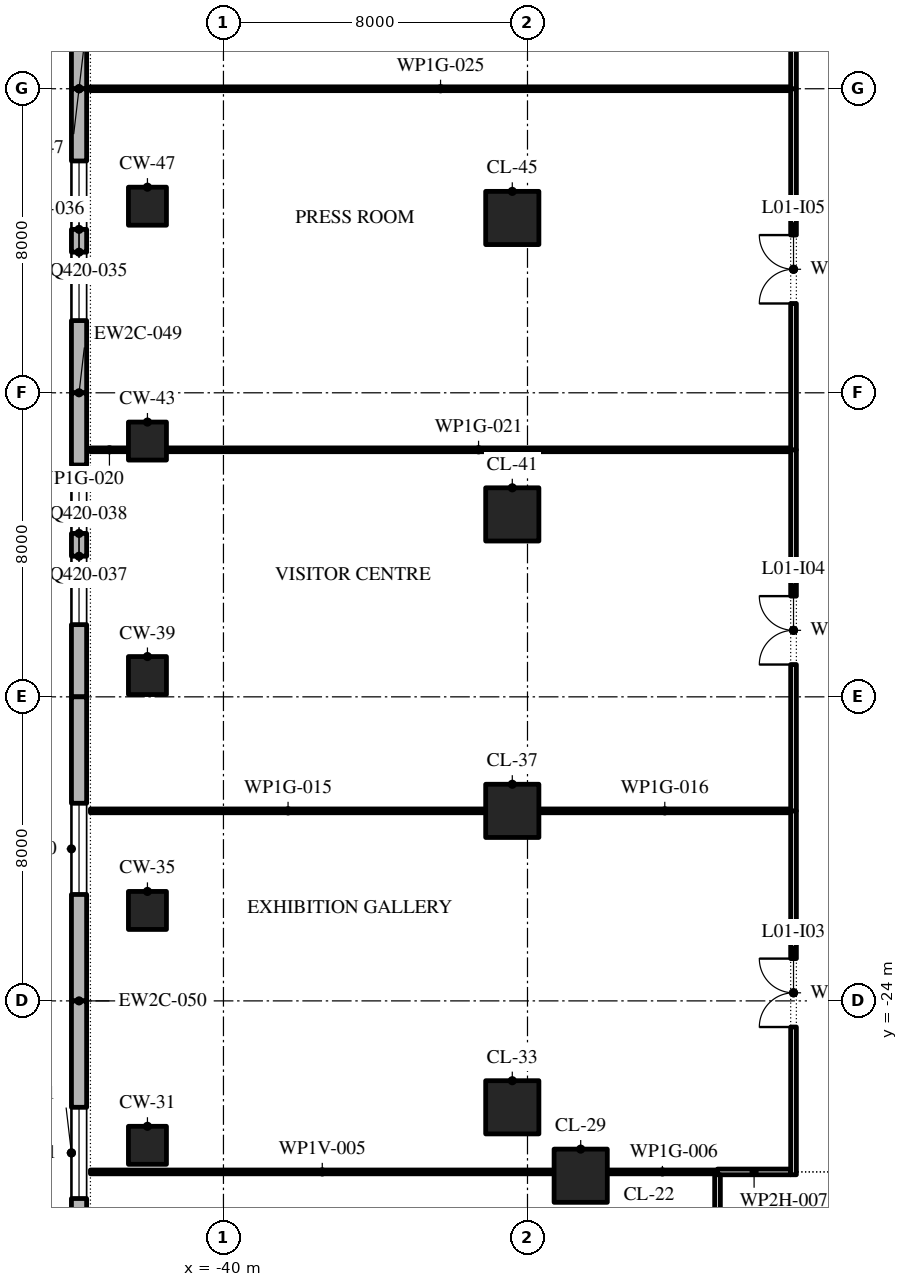
"""IFC4 building model, lengths in metres.
Left out: names, types, materials, properties, quantities, classifications, styles, units other than length and angle.
Written with IfcOpenShell. Run it as: python <this file> out.ifc"""

import sys

from ifc_helpers import new_model, si_unit, direction, frame, frame_2d, origin, origin_2d, place, context, subcontext, project, spatial, polyline, rectangle, outline, extrude, element, fill, save


model = new_model("IFC4")
c1 = context("Model", 3, precision=1e-05, world=origin(), true_north=direction((0.0, 1.0)))
c2 = subcontext(c1, "Body", "Model", "MODEL_VIEW")
j1 = project(units=[si_unit("LENGTHUNIT", "METRE"), si_unit("PLANEANGLEUNIT", "RADIAN")], contexts=[c1])
p1 = place(None, origin())
s1 = spatial("IfcSite", under=j1, at=p1, CompositionType="ELEMENT")
p2 = place(p1, origin())
s2 = spatial("IfcBuilding", under=s1, at=p2, CompositionType="ELEMENT")
p3 = place(p2, frame((0.0, 0.0, 8.0)))
s3 = spatial("IfcBuildingStorey", under=s2, at=p3, CompositionType="ELEMENT", Elevation=8.0)
p4 = place(p3, frame((-30.6, -28.6, 0.0), z_axis=(0.0, 0.0, 1.0), x_axis=(1.0, 0.0, 0.0)))
e1 = element("IfcColumn", 1, at=p4, inside=s3, PredefinedType="COLUMN", context=c2, shape_type="SweptSolid", body=[
    extrude(rectangle(XDim=1.4, YDim=1.4, at=origin_2d()), origin(), (0.0, 0.0, 1.0), 6.0),
])
p5 = place(p3, frame((-42.0, -27.8, 0.0), z_axis=(0.0, 0.0, 1.0), x_axis=(1.0, 0.0, 0.0)))
e2 = element("IfcColumn", 2, at=p5, inside=s3, PredefinedType="COLUMN", context=c2, shape_type="SweptSolid", body=[
    extrude(rectangle(XDim=1.0, YDim=1.0, at=origin_2d()), origin(), (0.0, 0.0, 1.0), 6.0),
])
p6 = place(p3, frame((-32.4, -26.8, 0.0), z_axis=(0.0, 0.0, 1.0), x_axis=(1.0, 0.0, 0.0)))
e3 = element("IfcColumn", 3, at=p6, inside=s3, PredefinedType="COLUMN", context=c2, shape_type="SweptSolid", body=[
    extrude(rectangle(XDim=1.4, YDim=1.4, at=origin_2d()), origin(), (0.0, 0.0, 1.0), 6.0),
])
p7 = place(p3, frame((-42.0, -21.62, 0.0), z_axis=(0.0, 0.0, 1.0), x_axis=(1.0, 0.0, 0.0)))
e4 = element("IfcColumn", 4, at=p7, inside=s3, PredefinedType="COLUMN", context=c2, shape_type="SweptSolid", body=[
    extrude(rectangle(XDim=1.0, YDim=1.0, at=origin_2d()), origin(), (0.0, 0.0, 1.0), 6.0),
])
p8 = place(p3, frame((-32.4, -19.0, 0.0), z_axis=(0.0, 0.0, 1.0), x_axis=(1.0, 0.0, 0.0)))
e5 = element("IfcColumn", 5, at=p8, inside=s3, PredefinedType="COLUMN", context=c2, shape_type="SweptSolid", body=[
    extrude(rectangle(XDim=1.4, YDim=1.4, at=origin_2d()), origin(), (0.0, 0.0, 1.0), 6.0),
])
p9 = place(p3, frame((-42.0, -15.44, 0.0), z_axis=(0.0, 0.0, 1.0), x_axis=(1.0, 0.0, 0.0)))
e6 = element("IfcColumn", 6, at=p9, inside=s3, PredefinedType="COLUMN", context=c2, shape_type="SweptSolid", body=[
    extrude(rectangle(XDim=1.0, YDim=1.0, at=origin_2d()), origin(), (0.0, 0.0, 1.0), 6.0),
])
p10 = place(p3, frame((-32.4, -11.2, 0.0), z_axis=(0.0, 0.0, 1.0), x_axis=(1.0, 0.0, 0.0)))
e7 = element("IfcColumn", 7, at=p10, inside=s3, PredefinedType="COLUMN", context=c2, shape_type="SweptSolid", body=[
    extrude(rectangle(XDim=1.4, YDim=1.4, at=origin_2d()), origin(), (0.0, 0.0, 1.0), 6.0),
])
p11 = place(p3, frame((-42.0, -9.27, 0.0), z_axis=(0.0, 0.0, 1.0), x_axis=(1.0, 0.0, 0.0)))
e8 = element("IfcColumn", 8, at=p11, inside=s3, PredefinedType="COLUMN", context=c2, shape_type="SweptSolid", body=[
    extrude(rectangle(XDim=1.0, YDim=1.0, at=origin_2d()), origin(), (0.0, 0.0, 1.0), 6.0),
])
p12 = place(p3, frame((-32.4, -3.4, 0.0), z_axis=(0.0, 0.0, 1.0), x_axis=(1.0, 0.0, 0.0)))
e9 = element("IfcColumn", 9, at=p12, inside=s3, PredefinedType="COLUMN", context=c2, shape_type="SweptSolid", body=[
    extrude(rectangle(XDim=1.4, YDim=1.4, at=origin_2d()), origin(), (0.0, 0.0, 1.0), 6.0),
])
p13 = place(p3, frame((-42.0, -3.09, 0.0), z_axis=(0.0, 0.0, 1.0), x_axis=(1.0, 0.0, 0.0)))
e10 = element("IfcColumn", 10, at=p13, inside=s3, PredefinedType="COLUMN", context=c2, shape_type="SweptSolid", body=[
    extrude(rectangle(XDim=1.0, YDim=1.0, at=origin_2d()), origin(), (0.0, 0.0, 1.0), 6.0),
])
p14 = place(p3, frame((-43.8, 8.0, 0.0), z_axis=(0.0, 0.0, 1.0), x_axis=(0.0, -1.0, 0.0)))
e11 = element("IfcWall", 11, at=p14, inside=s3, PredefinedType="STANDARD", context=c2, shape_type="SweptSolid", body=[
    extrude(rectangle(XDim=8.0, YDim=0.4, at=frame_2d((4.0, 0.0))), origin(), (0.0, 0.0, 1.0), 5.7),
])
p15 = place(p14, frame((1.9, 0.0, 0.9)))
e12 = element("IfcOpeningElement", 12, at=p15, cuts=e11, PredefinedType="OPENING", context=c2, shape_type="SweptSolid", body=[
    extrude(outline(polyline([(0.0, 0.0), (1.8, 0.0), (1.8, 2.641), (1.785, 2.876), (1.739, 3.107), (1.663, 3.33), (1.559, 3.541), (1.428, 3.737), (1.273, 3.914), (1.096, 4.069), (0.9, 4.2), (0.704, 4.069), (0.527, 3.914), (0.372, 3.737), (0.241, 3.541), (0.137, 3.33), (0.061, 3.107), (0.015, 2.876), (0.0, 2.641), (0.0, 0.0)])), frame((0.0, 0.21, 0.0), z_axis=(0.0, -1.0, 0.0), x_axis=(1.0, 0.0, 0.0)), (0.0, 0.0, 1.0), 0.42),
])
p16 = place(p14, frame((4.3, 0.0, 0.9)))
e13 = element("IfcOpeningElement", 13, at=p16, cuts=e11, PredefinedType="OPENING", context=c2, shape_type="SweptSolid", body=[
    extrude(outline(polyline([(0.0, 0.0), (1.8, 0.0), (1.8, 2.641), (1.785, 2.876), (1.739, 3.107), (1.663, 3.33), (1.559, 3.541), (1.428, 3.737), (1.273, 3.914), (1.096, 4.069), (0.9, 4.2), (0.704, 4.069), (0.527, 3.914), (0.372, 3.737), (0.241, 3.541), (0.137, 3.33), (0.061, 3.107), (0.015, 2.876), (0.0, 2.641), (0.0, 0.0)])), frame((0.0, 0.21, 0.0), z_axis=(0.0, -1.0, 0.0), x_axis=(1.0, 0.0, 0.0)), (0.0, 0.0, 1.0), 0.42),
])
p17 = place(p3, frame((-43.8, 0.0, 0.0), z_axis=(0.0, 0.0, 1.0), x_axis=(0.0, -1.0, 0.0)))
e14 = element("IfcWall", 14, at=p17, inside=s3, PredefinedType="STANDARD", context=c2, shape_type="SweptSolid", body=[
    extrude(rectangle(XDim=8.0, YDim=0.4, at=frame_2d((4.0, 0.0))), origin(), (0.0, 0.0, 1.0), 5.7),
])
p18 = place(p17, frame((1.9, 0.0, 0.9)))
e15 = element("IfcOpeningElement", 15, at=p18, cuts=e14, PredefinedType="OPENING", context=c2, shape_type="SweptSolid", body=[
    extrude(outline(polyline([(0.0, 0.0), (1.8, 0.0), (1.8, 2.641), (1.785, 2.876), (1.739, 3.107), (1.663, 3.33), (1.559, 3.541), (1.428, 3.737), (1.273, 3.914), (1.096, 4.069), (0.9, 4.2), (0.704, 4.069), (0.527, 3.914), (0.372, 3.737), (0.241, 3.541), (0.137, 3.33), (0.061, 3.107), (0.015, 2.876), (0.0, 2.641), (0.0, 0.0)])), frame((0.0, 0.21, 0.0), z_axis=(0.0, -1.0, 0.0), x_axis=(1.0, 0.0, 0.0)), (0.0, 0.0, 1.0), 0.42),
])
p19 = place(p17, frame((4.3, 0.0, 0.9)))
e16 = element("IfcOpeningElement", 16, at=p19, cuts=e14, PredefinedType="OPENING", context=c2, shape_type="SweptSolid", body=[
    extrude(outline(polyline([(0.0, 0.0), (1.8, 0.0), (1.8, 2.641), (1.785, 2.876), (1.739, 3.107), (1.663, 3.33), (1.559, 3.541), (1.428, 3.737), (1.273, 3.914), (1.096, 4.069), (0.9, 4.2), (0.704, 4.069), (0.527, 3.914), (0.372, 3.737), (0.241, 3.541), (0.137, 3.33), (0.061, 3.107), (0.015, 2.876), (0.0, 2.641), (0.0, 0.0)])), frame((0.0, 0.21, 0.0), z_axis=(0.0, -1.0, 0.0), x_axis=(1.0, 0.0, 0.0)), (0.0, 0.0, 1.0), 0.42),
])
p20 = place(p3, frame((-43.8, -8.0, 0.0), z_axis=(0.0, 0.0, 1.0), x_axis=(0.0, -1.0, 0.0)))
e17 = element("IfcWall", 17, at=p20, inside=s3, PredefinedType="STANDARD", context=c2, shape_type="SweptSolid", body=[
    extrude(rectangle(XDim=8.0, YDim=0.4, at=frame_2d((4.0, 0.0))), origin(), (0.0, 0.0, 1.0), 5.7),
])
p21 = place(p20, frame((1.9, 0.0, 0.9)))
e18 = element("IfcOpeningElement", 18, at=p21, cuts=e17, PredefinedType="OPENING", context=c2, shape_type="SweptSolid", body=[
    extrude(outline(polyline([(0.0, 0.0), (1.8, 0.0), (1.8, 2.641), (1.785, 2.876), (1.739, 3.107), (1.663, 3.33), (1.559, 3.541), (1.428, 3.737), (1.273, 3.914), (1.096, 4.069), (0.9, 4.2), (0.704, 4.069), (0.527, 3.914), (0.372, 3.737), (0.241, 3.541), (0.137, 3.33), (0.061, 3.107), (0.015, 2.876), (0.0, 2.641), (0.0, 0.0)])), frame((0.0, 0.21, 0.0), z_axis=(0.0, -1.0, 0.0), x_axis=(1.0, 0.0, 0.0)), (0.0, 0.0, 1.0), 0.42),
])
p22 = place(p20, frame((4.3, 0.0, 0.9)))
e19 = element("IfcOpeningElement", 19, at=p22, cuts=e17, PredefinedType="OPENING", context=c2, shape_type="SweptSolid", body=[
    extrude(outline(polyline([(0.0, 0.0), (1.8, 0.0), (1.8, 2.641), (1.785, 2.876), (1.739, 3.107), (1.663, 3.33), (1.559, 3.541), (1.428, 3.737), (1.273, 3.914), (1.096, 4.069), (0.9, 4.2), (0.704, 4.069), (0.527, 3.914), (0.372, 3.737), (0.241, 3.541), (0.137, 3.33), (0.061, 3.107), (0.015, 2.876), (0.0, 2.641), (0.0, 0.0)])), frame((0.0, 0.21, 0.0), z_axis=(0.0, -1.0, 0.0), x_axis=(1.0, 0.0, 0.0)), (0.0, 0.0, 1.0), 0.42),
])
p23 = place(p3, frame((-43.8, -16.0, 0.0), z_axis=(0.0, 0.0, 1.0), x_axis=(0.0, -1.0, 0.0)))
e20 = element("IfcWall", 20, at=p23, inside=s3, PredefinedType="STANDARD", context=c2, shape_type="SweptSolid", body=[
    extrude(rectangle(XDim=8.0, YDim=0.4, at=frame_2d((4.0, 0.0))), origin(), (0.0, 0.0, 1.0), 5.7),
])
p24 = place(p23, frame((2.8, 0.0, 0.9)))
e21 = element("IfcOpeningElement", 21, at=p24, cuts=e20, PredefinedType="OPENING", context=c2, shape_type="SweptSolid", body=[
    extrude(outline(polyline([(0.0, 0.0), (2.4, 0.0), (2.4, 2.122), (2.379, 2.435), (2.318, 2.743), (2.217, 3.04), (2.078, 3.322), (1.904, 3.583), (1.697, 3.819), (1.461, 4.026), (1.2, 4.2), (0.939, 4.026), (0.703, 3.819), (0.496, 3.583), (0.322, 3.322), (0.183, 3.04), (0.082, 2.743), (0.021, 2.435), (0.0, 2.122), (0.0, 0.0)])), frame((0.0, 0.21, 0.0), z_axis=(0.0, -1.0, 0.0), x_axis=(1.0, 0.0, 0.0)), (0.0, 0.0, 1.0), 0.42),
])
p25 = place(p3, frame((-43.8, -24.0, 0.0), z_axis=(0.0, 0.0, 1.0), x_axis=(0.0, -1.0, 0.0)))
e22 = element("IfcWall", 22, at=p25, inside=s3, PredefinedType="STANDARD", context=c2, shape_type="SweptSolid", body=[
    extrude(rectangle(XDim=8.0, YDim=0.4, at=frame_2d((4.0, 0.0))), origin(), (0.0, 0.0, 1.0), 5.7),
])
p26 = place(p25, frame((2.8, 0.0, 0.9)))
e23 = element("IfcOpeningElement", 23, at=p26, cuts=e22, PredefinedType="OPENING", context=c2, shape_type="SweptSolid", body=[
    extrude(outline(polyline([(0.0, 0.0), (2.4, 0.0), (2.4, 2.122), (2.379, 2.435), (2.318, 2.743), (2.217, 3.04), (2.078, 3.322), (1.904, 3.583), (1.697, 3.819), (1.461, 4.026), (1.2, 4.2), (0.939, 4.026), (0.703, 3.819), (0.496, 3.583), (0.322, 3.322), (0.183, 3.04), (0.082, 2.743), (0.021, 2.435), (0.0, 2.122), (0.0, 0.0)])), frame((0.0, 0.21, 0.0), z_axis=(0.0, -1.0, 0.0), x_axis=(1.0, 0.0, 0.0)), (0.0, 0.0, 1.0), 0.42),
])
p27 = place(p3, frame((-43.5, -28.5, 0.0), z_axis=(0.0, 0.0, 1.0), x_axis=(1.0, 0.0, 0.0)))
e24 = element("IfcWall", 24, at=p27, inside=s3, PredefinedType="PARTITIONING", context=c2, shape_type="SweptSolid", body=[
    extrude(rectangle(XDim=12.2, YDim=0.1, at=frame_2d((6.1, 0.0))), origin(), (0.0, 0.0, 1.0), 5.164),
])
p28 = place(p3, frame((-29.9, -28.5, 0.0), z_axis=(0.0, 0.0, 1.0), x_axis=(1.0, 0.0, 0.0)))
e25 = element("IfcWall", 25, at=p28, inside=s3, PredefinedType="PARTITIONING", context=c2, shape_type="SweptSolid", body=[
    extrude(rectangle(XDim=2.9, YDim=0.1, at=frame_2d((1.45, 0.0))), origin(), (0.0, 0.0, 1.0), 5.7),
])
p29 = place(p3, frame((-27.0, -28.5, 0.0), z_axis=(0.0, 0.0, 1.0), x_axis=(1.0, 0.0, 0.0)))
e26 = element("IfcWall", 26, at=p29, inside=s3, PredefinedType="PARTITIONING", context=c2, shape_type="SweptSolid", body=[
    extrude(rectangle(XDim=1.925, YDim=0.15, at=frame_2d((0.962, 0.0))), origin(), (0.0, 0.0, 1.0), 5.7),
])
p30 = place(p3, frame((-43.5, -19.0, 0.0), z_axis=(0.0, 0.0, 1.0), x_axis=(1.0, 0.0, 0.0)))
e27 = element("IfcWall", 27, at=p30, inside=s3, PredefinedType="PARTITIONING", context=c2, shape_type="SweptSolid", body=[
    extrude(rectangle(XDim=10.4, YDim=0.1, at=frame_2d((5.2, 0.0))), origin(), (0.0, 0.0, 1.0), 5.7),
])
p31 = place(p3, frame((-31.7, -19.0, 0.0), z_axis=(0.0, 0.0, 1.0), x_axis=(1.0, 0.0, 0.0)))
e28 = element("IfcWall", 28, at=p31, inside=s3, PredefinedType="PARTITIONING", context=c2, shape_type="SweptSolid", body=[
    extrude(rectangle(XDim=6.625, YDim=0.1, at=frame_2d((3.312, 0.0))), origin(), (0.0, 0.0, 1.0), 5.7),
])
p32 = place(p3, frame((-43.5, -9.5, 0.0), z_axis=(0.0, 0.0, 1.0), x_axis=(1.0, 0.0, 0.0)))
e29 = element("IfcWall", 29, at=p32, inside=s3, PredefinedType="PARTITIONING", context=c2, shape_type="SweptSolid", body=[
    extrude(rectangle(XDim=1.0, YDim=0.1, at=frame_2d((0.5, 0.0))), origin(), (0.0, 0.0, 1.0), 5.7),
])
p33 = place(p3, frame((-41.5, -9.5, 0.0), z_axis=(0.0, 0.0, 1.0), x_axis=(1.0, 0.0, 0.0)))
e30 = element("IfcWall", 30, at=p33, inside=s3, PredefinedType="PARTITIONING", context=c2, shape_type="SweptSolid", body=[
    extrude(rectangle(XDim=16.425, YDim=0.1, at=frame_2d((8.212, 0.0))), origin(), (0.0, 0.0, 1.0), 5.7),
])
p34 = place(p3, frame((-43.5, 0.0, 0.0), z_axis=(0.0, 0.0, 1.0), x_axis=(1.0, 0.0, 0.0)))
e31 = element("IfcWall", 31, at=p34, inside=s3, PredefinedType="PARTITIONING", context=c2, shape_type="SweptSolid", body=[
    extrude(rectangle(XDim=18.425, YDim=0.1, at=frame_2d((9.212, 0.0))), origin(), (0.0, 0.0, 1.0), 5.7),
])
p35 = place(p3, frame((-27.0, -32.0, 0.0), z_axis=(0.0, 0.0, 1.0), x_axis=(0.0, 1.0, 0.0)))
e32 = element("IfcWall", 32, at=p35, inside=s3, PredefinedType="PARTITIONING", context=c2, shape_type="SweptSolid", body=[
    extrude(rectangle(XDim=3.425, YDim=0.15, at=frame_2d((1.712, 0.0))), origin(), (0.0, 0.0, 1.0), 5.7),
])
p36 = place(p3, frame((-25.0, -28.575, 0.0), z_axis=(0.0, 0.0, 1.0), x_axis=(0.0, 1.0, 0.0)))
e33 = element("IfcWall", 33, at=p36, inside=s3, PredefinedType="PARTITIONING", context=c2, shape_type="SweptSolid", body=[
    extrude(rectangle(XDim=9.575, YDim=0.15, at=frame_2d((4.788, 0.0))), origin(), (0.0, 0.0, 1.0), 5.7),
])
p37 = place(p36, frame((3.887, 0.0, 0.0)))
e34 = element("IfcOpeningElement", 34, at=p37, cuts=e33, PredefinedType="OPENING", context=c2, shape_type="SweptSolid", body=[
    extrude(rectangle(XDim=1.8, YDim=2.1, at=frame_2d((0.9, 1.05))), frame((0.0, 0.085, 0.0), z_axis=(0.0, -1.0, 0.0), x_axis=(1.0, 0.0, 0.0)), (0.0, 0.0, 1.0), 0.17),
])
p38 = place(p3, frame((-25.0, -19.0, 0.0), z_axis=(0.0, 0.0, 1.0), x_axis=(0.0, 1.0, 0.0)))
e35 = element("IfcWall", 35, at=p38, inside=s3, PredefinedType="PARTITIONING", context=c2, shape_type="SweptSolid", body=[
    extrude(rectangle(XDim=9.5, YDim=0.15, at=frame_2d((4.75, 0.0))), origin(), (0.0, 0.0, 1.0), 5.7),
])
p39 = place(p38, frame((3.85, 0.0, 0.0)))
e36 = element("IfcOpeningElement", 36, at=p39, cuts=e35, PredefinedType="OPENING", context=c2, shape_type="SweptSolid", body=[
    extrude(rectangle(XDim=1.8, YDim=2.1, at=frame_2d((0.9, 1.05))), frame((0.0, 0.085, 0.0), z_axis=(0.0, -1.0, 0.0), x_axis=(1.0, 0.0, 0.0)), (0.0, 0.0, 1.0), 0.17),
])
p40 = place(p3, frame((-25.0, -9.5, 0.0), z_axis=(0.0, 0.0, 1.0), x_axis=(0.0, 1.0, 0.0)))
e37 = element("IfcWall", 37, at=p40, inside=s3, PredefinedType="PARTITIONING", context=c2, shape_type="SweptSolid", body=[
    extrude(rectangle(XDim=9.5, YDim=0.15, at=frame_2d((4.75, 0.0))), origin(), (0.0, 0.0, 1.0), 5.7),
])
p41 = place(p40, frame((3.85, 0.0, 0.0)))
e38 = element("IfcOpeningElement", 38, at=p41, cuts=e37, PredefinedType="OPENING", context=c2, shape_type="SweptSolid", body=[
    extrude(rectangle(XDim=1.8, YDim=2.1, at=frame_2d((0.9, 1.05))), frame((0.0, 0.085, 0.0), z_axis=(0.0, -1.0, 0.0), x_axis=(1.0, 0.0, 0.0)), (0.0, 0.0, 1.0), 0.17),
])
p42 = place(p3, frame((-25.0, 0.0, 0.0), z_axis=(0.0, 0.0, 1.0), x_axis=(0.0, 1.0, 0.0)))
e39 = element("IfcWall", 39, at=p42, inside=s3, PredefinedType="PARTITIONING", context=c2, shape_type="SweptSolid", body=[
    extrude(rectangle(XDim=9.5, YDim=0.15, at=frame_2d((4.75, 0.0))), origin(), (0.0, 0.0, 1.0), 5.7),
])
p43 = place(p42, frame((3.85, 0.0, 0.0)))
e40 = element("IfcOpeningElement", 40, at=p43, cuts=e39, PredefinedType="OPENING", context=c2, shape_type="SweptSolid", body=[
    extrude(rectangle(XDim=1.8, YDim=2.1, at=frame_2d((0.9, 1.05))), frame((0.0, 0.085, 0.0), z_axis=(0.0, -1.0, 0.0), x_axis=(1.0, 0.0, 0.0)), (0.0, 0.0, 1.0), 0.17),
])
p44 = place(p18, origin())
e41 = element("IfcWindow", 41, at=p44, inside=s3, PartitioningType="DOUBLE_PANEL_VERTICAL", PredefinedType="WINDOW", context=c2, shape_type="SweptSolid", body=[
    extrude(outline(polyline([(0.0, 0.0), (1.8, 0.0), (1.8, 2.641), (1.785, 2.876), (1.739, 3.107), (1.663, 3.33), (1.559, 3.541), (1.428, 3.737), (1.273, 3.914), (1.096, 4.069), (0.9, 4.2), (0.704, 4.069), (0.527, 3.914), (0.372, 3.737), (0.241, 3.541), (0.137, 3.33), (0.061, 3.107), (0.015, 2.876), (0.0, 2.641), (0.0, 0.0)])), frame((0.0, 0.03, 0.0), z_axis=(0.0, -1.0, 0.0), x_axis=(1.0, 0.0, 0.0)), (0.0, 0.0, 1.0), 0.06),
])
fill(e15, e41)
p45 = place(p19, origin())
e42 = element("IfcWindow", 42, at=p45, inside=s3, PartitioningType="DOUBLE_PANEL_VERTICAL", PredefinedType="WINDOW", context=c2, shape_type="SweptSolid", body=[
    extrude(outline(polyline([(0.0, 0.0), (1.8, 0.0), (1.8, 2.641), (1.785, 2.876), (1.739, 3.107), (1.663, 3.33), (1.559, 3.541), (1.428, 3.737), (1.273, 3.914), (1.096, 4.069), (0.9, 4.2), (0.704, 4.069), (0.527, 3.914), (0.372, 3.737), (0.241, 3.541), (0.137, 3.33), (0.061, 3.107), (0.015, 2.876), (0.0, 2.641), (0.0, 0.0)])), frame((0.0, 0.03, 0.0), z_axis=(0.0, -1.0, 0.0), x_axis=(1.0, 0.0, 0.0)), (0.0, 0.0, 1.0), 0.06),
])
fill(e16, e42)
p46 = place(p21, origin())
e43 = element("IfcWindow", 43, at=p46, inside=s3, PartitioningType="DOUBLE_PANEL_VERTICAL", PredefinedType="WINDOW", context=c2, shape_type="SweptSolid", body=[
    extrude(outline(polyline([(0.0, 0.0), (1.8, 0.0), (1.8, 2.641), (1.785, 2.876), (1.739, 3.107), (1.663, 3.33), (1.559, 3.541), (1.428, 3.737), (1.273, 3.914), (1.096, 4.069), (0.9, 4.2), (0.704, 4.069), (0.527, 3.914), (0.372, 3.737), (0.241, 3.541), (0.137, 3.33), (0.061, 3.107), (0.015, 2.876), (0.0, 2.641), (0.0, 0.0)])), frame((0.0, 0.03, 0.0), z_axis=(0.0, -1.0, 0.0), x_axis=(1.0, 0.0, 0.0)), (0.0, 0.0, 1.0), 0.06),
])
fill(e18, e43)
p47 = place(p22, origin())
e44 = element("IfcWindow", 44, at=p47, inside=s3, PartitioningType="DOUBLE_PANEL_VERTICAL", PredefinedType="WINDOW", context=c2, shape_type="SweptSolid", body=[
    extrude(outline(polyline([(0.0, 0.0), (1.8, 0.0), (1.8, 2.641), (1.785, 2.876), (1.739, 3.107), (1.663, 3.33), (1.559, 3.541), (1.428, 3.737), (1.273, 3.914), (1.096, 4.069), (0.9, 4.2), (0.704, 4.069), (0.527, 3.914), (0.372, 3.737), (0.241, 3.541), (0.137, 3.33), (0.061, 3.107), (0.015, 2.876), (0.0, 2.641), (0.0, 0.0)])), frame((0.0, 0.03, 0.0), z_axis=(0.0, -1.0, 0.0), x_axis=(1.0, 0.0, 0.0)), (0.0, 0.0, 1.0), 0.06),
])
fill(e19, e44)
p48 = place(p24, origin())
e45 = element("IfcWindow", 45, at=p48, inside=s3, PartitioningType="DOUBLE_PANEL_VERTICAL", PredefinedType="WINDOW", context=c2, shape_type="SweptSolid", body=[
    extrude(outline(polyline([(0.0, 0.0), (2.4, 0.0), (2.4, 2.122), (2.379, 2.435), (2.318, 2.743), (2.217, 3.04), (2.078, 3.322), (1.904, 3.583), (1.697, 3.819), (1.461, 4.026), (1.2, 4.2), (0.939, 4.026), (0.703, 3.819), (0.496, 3.583), (0.322, 3.322), (0.183, 3.04), (0.082, 2.743), (0.021, 2.435), (0.0, 2.122), (0.0, 0.0)])), frame((0.0, 0.03, 0.0), z_axis=(0.0, -1.0, 0.0), x_axis=(1.0, 0.0, 0.0)), (0.0, 0.0, 1.0), 0.06),
])
fill(e21, e45)
p49 = place(p26, origin())
e46 = element("IfcWindow", 46, at=p49, inside=s3, PartitioningType="DOUBLE_PANEL_VERTICAL", PredefinedType="WINDOW", context=c2, shape_type="SweptSolid", body=[
    extrude(outline(polyline([(0.0, 0.0), (2.4, 0.0), (2.4, 2.122), (2.379, 2.435), (2.318, 2.743), (2.217, 3.04), (2.078, 3.322), (1.904, 3.583), (1.697, 3.819), (1.461, 4.026), (1.2, 4.2), (0.939, 4.026), (0.703, 3.819), (0.496, 3.583), (0.322, 3.322), (0.183, 3.04), (0.082, 2.743), (0.021, 2.435), (0.0, 2.122), (0.0, 0.0)])), frame((0.0, 0.03, 0.0), z_axis=(0.0, -1.0, 0.0), x_axis=(1.0, 0.0, 0.0)), (0.0, 0.0, 1.0), 0.06),
])
fill(e23, e46)
p50 = place(p37, origin())
e47 = element("IfcDoor", 47, at=p50, inside=s3, OperationType="SINGLE_SWING_LEFT", PredefinedType="DOOR", context=c2, shape_type="SweptSolid", body=[
    extrude(rectangle(XDim=1.8, YDim=2.1, at=frame_2d((0.9, 1.05))), frame((0.0, 0.025, 0.0), z_axis=(0.0, -1.0, 0.0), x_axis=(1.0, 0.0, 0.0)), (0.0, 0.0, 1.0), 0.05),
])
fill(e34, e47)
p51 = place(p39, origin())
e48 = element("IfcDoor", 48, at=p51, inside=s3, OperationType="SINGLE_SWING_RIGHT", PredefinedType="DOOR", context=c2, shape_type="SweptSolid", body=[
    extrude(rectangle(XDim=1.8, YDim=2.1, at=frame_2d((0.9, 1.05))), frame((0.0, 0.025, 0.0), z_axis=(0.0, -1.0, 0.0), x_axis=(1.0, 0.0, 0.0)), (0.0, 0.0, 1.0), 0.05),
])
fill(e36, e48)
p52 = place(p41, origin())
e49 = element("IfcDoor", 49, at=p52, inside=s3, OperationType="SINGLE_SWING_RIGHT", PredefinedType="DOOR", context=c2, shape_type="SweptSolid", body=[
    extrude(rectangle(XDim=1.8, YDim=2.1, at=frame_2d((0.9, 1.05))), frame((0.0, 0.025, 0.0), z_axis=(0.0, -1.0, 0.0), x_axis=(1.0, 0.0, 0.0)), (0.0, 0.0, 1.0), 0.05),
])
fill(e38, e49)
save(model, sys.argv[1])
